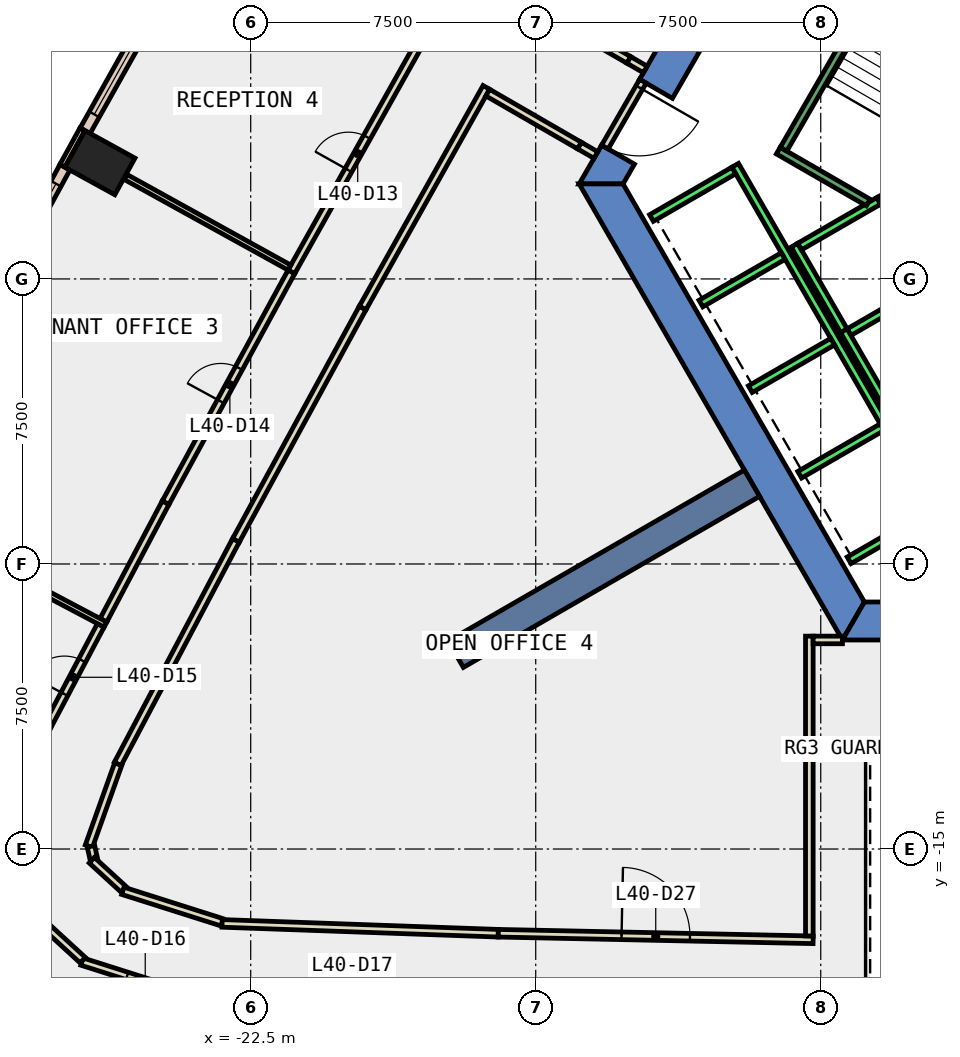
"""IFC4 building model, lengths in metres.
Left out: names, types, materials, properties, quantities, classifications, styles, units other than length and angle.
Written with IfcOpenShell. Run it as: python <this file> out.ifc"""

import sys

from ifc_helpers import new_model, si_unit, direction, frame, frame_2d, origin, origin_2d, place, context, subcontext, project, spatial, polyline, rectangle, outline, extrude, element, fill, save


model = new_model("IFC4")
c1 = context("Model", 3, precision=1e-05, world=origin(), true_north=direction((0.0, 1.0)))
c2 = subcontext(c1, "Body", "Model", "MODEL_VIEW")
j1 = project(units=[si_unit("LENGTHUNIT", "METRE"), si_unit("PLANEANGLEUNIT", "RADIAN")], contexts=[c1])
p1 = place(None, origin())
s1 = spatial("IfcSite", under=j1, at=p1, CompositionType="ELEMENT")
p2 = place(p1, origin())
s2 = spatial("IfcBuilding", under=s1, at=p2, CompositionType="ELEMENT")
p3 = place(p2, frame((0.0, 0.0, 180.2)))
s3 = spatial("IfcBuildingStorey", under=s2, at=p3, CompositionType="ELEMENT", Elevation=180.2)
p4 = place(p3, frame((-26.468, 3.059, -0.4), z_axis=(0.0, 0.0, 1.0), x_axis=(0.481983074142, 0.876180527198, 0.0)))
e1 = element("IfcColumn", 1, at=p4, inside=s3, PredefinedType="COLUMN", context=c2, shape_type="SweptSolid", body=[
    extrude(rectangle(XDim=1.1, YDim=1.5, at=origin_2d()), origin(), (0.0, 0.0, 1.0), 4.0),
])
p5 = place(p3, frame((0.0, 0.0, -0.4)))
e2 = element("IfcWall", 2, at=p5, inside=s3, PredefinedType="SHEAR", context=c2, shape_type="SweptSolid", body=[
    extrude(outline(polyline([(-12.267, 5.252), (-11.402, 4.752), (-6.351, 13.5), (-6.928, 14.5), (-12.267, 5.252)])), origin(), (0.0, 0.0, 1.0), 4.0),
])
p6 = place(p3, frame((0.0, 0.0, -0.4)))
e3 = element("IfcWall", 3, at=p6, inside=s3, PredefinedType="SHEAR", context=c2, shape_type="SweptSolid", body=[
    extrude(outline(polyline([(-12.402, 3.02), (-13.267, 3.52), (-13.856, 2.5), (-12.702, 2.5), (-12.402, 3.02)])), origin(), (0.0, 0.0, 1.0), 4.0),
])
p7 = place(p3, frame((0.0, 0.0, -0.4)))
e4 = element("IfcWall", 4, at=p7, inside=s3, PredefinedType="SHEAR", context=c2, shape_type="SweptSolid", body=[
    extrude(outline(polyline([(-13.856, 2.5), (-6.928, -9.5), (-6.351, -8.5), (-12.702, 2.5), (-13.856, 2.5)])), origin(), (0.0, 0.0, 1.0), 4.0),
])
p8 = place(p3, frame((0.0, 0.0, -0.4)))
e5 = element("IfcWall", 5, at=p8, inside=s3, PredefinedType="SHEAR", context=c2, shape_type="SweptSolid", body=[
    extrude(outline(polyline([(3.75, -9.5), (3.75, -8.5), (-6.351, -8.5), (-6.928, -9.5), (3.75, -9.5)])), origin(), (0.0, 0.0, 1.0), 4.0),
])
p9 = place(p3, frame((-9.31, -5.375, -0.4), z_axis=(0.0, 0.0, 1.0), x_axis=(-0.866017533419, -0.500013631625, 0.0)))
e6 = element("IfcWall", 6, at=p9, inside=s3, PredefinedType="SHEAR", context=c2, shape_type="SweptSolid", body=[
    extrude(rectangle(XDim=9.0, YDim=0.8, at=frame_2d((4.5, 0.0))), origin(), (0.0, 0.0, 1.0), 4.0),
])
p10 = place(p3, frame((-26.926, 3.939, 0.0), z_axis=(0.0, 0.0, 1.0), x_axis=(-0.481850587491, -0.876253394478, 0.0)))
e7 = element("IfcWall", 7, at=p10, inside=s3, PredefinedType="STANDARD", context=c2, shape_type="SweptSolid", body=[
    extrude(rectangle(XDim=1.1, YDim=0.15, at=frame_2d((0.55, 0.0))), origin(), (0.0, 0.0, 1.0), 3.6),
])
p11 = place(p3, frame((-23.936, 9.106, 0.0), z_axis=(0.0, 0.0, 1.0), x_axis=(-0.489305602904, -0.872112393541, 0.0)))
e8 = element("IfcWall", 8, at=p11, inside=s3, PredefinedType="STANDARD", context=c2, shape_type="SweptSolid", body=[
    extrude(rectangle(XDim=5.969, YDim=0.3, at=frame_2d((2.985, 0.0))), origin(), (0.0, 0.0, 1.0), 3.6),
])
p12 = place(p11, frame((0.492, 0.0, 0.9)))
e9 = element("IfcOpeningElement", 9, at=p12, cuts=e8, PredefinedType="OPENING", context=c2, shape_type="SweptSolid", body=[
    extrude(rectangle(XDim=2.0, YDim=2.6, at=frame_2d((1.0, 1.3))), frame((0.0, 0.16, 0.0), z_axis=(0.0, -1.0, 0.0), x_axis=(1.0, 0.0, 0.0)), (0.0, 0.0, 1.0), 0.32),
])
p13 = place(p11, frame((3.477, 0.0, 0.9)))
e10 = element("IfcOpeningElement", 10, at=p13, cuts=e8, PredefinedType="OPENING", context=c2, shape_type="SweptSolid", body=[
    extrude(rectangle(XDim=2.0, YDim=2.6, at=frame_2d((1.0, 1.3))), frame((0.0, 0.16, 0.0), z_axis=(0.0, -1.0, 0.0), x_axis=(1.0, 0.0, 0.0)), (0.0, 0.0, 1.0), 0.32),
])
p14 = place(p3, frame((-27.388, 2.939, 0.0), z_axis=(0.0, 0.0, 1.0), x_axis=(-0.478711740571, -0.877972134774, 0.0)))
e11 = element("IfcWall", 11, at=p14, inside=s3, PredefinedType="STANDARD", context=c2, shape_type="SweptSolid", body=[
    extrude(rectangle(XDim=5.97, YDim=0.3, at=frame_2d((2.985, 0.0))), origin(), (0.0, 0.0, 1.0), 3.6),
])
p15 = place(p14, frame((0.493, 0.0, 0.9)))
e12 = element("IfcOpeningElement", 12, at=p15, cuts=e11, PredefinedType="OPENING", context=c2, shape_type="SweptSolid", body=[
    extrude(rectangle(XDim=2.0, YDim=2.6, at=frame_2d((1.0, 1.3))), frame((0.0, 0.16, 0.0), z_axis=(0.0, -1.0, 0.0), x_axis=(1.0, 0.0, 0.0)), (0.0, 0.0, 1.0), 0.32),
])
p16 = place(p14, frame((3.478, 0.0, 0.9)))
e13 = element("IfcOpeningElement", 13, at=p16, cuts=e11, PredefinedType="OPENING", context=c2, shape_type="SweptSolid", body=[
    extrude(rectangle(XDim=2.0, YDim=2.6, at=frame_2d((1.0, 1.3))), frame((0.0, 0.16, 0.0), z_axis=(0.0, -1.0, 0.0), x_axis=(1.0, 0.0, 0.0)), (0.0, 0.0, 1.0), 0.32),
])
p17 = place(p3, frame((-14.966, 7.157, 0.0), z_axis=(0.0, 0.0, 1.0), x_axis=(0.86600487494, -0.500035555316, 0.0)))
e14 = element("IfcWall", 14, at=p17, inside=s3, PredefinedType="PARTITIONING", context=c2, shape_type="SweptSolid", body=[
    extrude(rectangle(XDim=2.79, YDim=0.2, at=frame_2d((1.395, 0.0))), origin(), (0.0, 0.0, 1.0), 3.6),
])
p18 = place(p3, frame((-22.888, -6.878, 0.0), z_axis=(0.0, 0.0, 1.0), x_axis=(-0.467533790284, -0.883975200411, 0.0)))
e15 = element("IfcWall", 15, at=p18, inside=s3, PredefinedType="PARTITIONING", context=c2, shape_type="SweptSolid", body=[
    extrude(rectangle(XDim=6.656, YDim=0.2, at=frame_2d((3.328, 0.0))), origin(), (0.0, 0.0, 1.0), 3.6),
])
p19 = place(p3, frame((-25.987, -12.768, 0.0), z_axis=(0.0, 0.0, 1.0), x_axis=(-0.33645112914, -0.941700927949, 0.0)))
e16 = element("IfcWall", 16, at=p19, inside=s3, PredefinedType="PARTITIONING", context=c2, shape_type="SweptSolid", body=[
    extrude(rectangle(XDim=2.292, YDim=0.2, at=frame_2d((1.146, 0.0))), origin(), (0.0, 0.0, 1.0), 3.6),
])
p20 = place(p3, frame((-26.703, -14.93, 0.0), z_axis=(0.0, 0.0, 1.0), x_axis=(0.216250293589, -0.976337959173, 0.0)))
e17 = element("IfcWall", 17, at=p20, inside=s3, PredefinedType="PARTITIONING", context=c2, shape_type="SweptSolid", body=[
    extrude(rectangle(XDim=0.342, YDim=0.2, at=frame_2d((0.171, 0.0))), origin(), (0.0, 0.0, 1.0), 3.6),
])
p21 = place(p3, frame((-26.681, -15.294, 0.0), z_axis=(0.0, 0.0, 1.0), x_axis=(0.737118519418, -0.675763485497, 0.0)))
e18 = element("IfcWall", 18, at=p21, inside=s3, PredefinedType="PARTITIONING", context=c2, shape_type="SweptSolid", body=[
    extrude(rectangle(XDim=1.138, YDim=0.2, at=frame_2d((0.569, 0.0))), origin(), (0.0, 0.0, 1.0), 3.6),
])
p22 = place(p3, frame((-25.864, -16.1, 0.0), z_axis=(0.0, 0.0, 1.0), x_axis=(0.953158072423, -0.302472625167, 0.0)))
e19 = element("IfcWall", 19, at=p22, inside=s3, PredefinedType="PARTITIONING", context=c2, shape_type="SweptSolid", body=[
    extrude(rectangle(XDim=2.743, YDim=0.2, at=frame_2d((1.372, 0.0))), origin(), (0.0, 0.0, 1.0), 3.6),
])
p23 = place(p3, frame((-23.253, -16.957, 0.0), z_axis=(0.0, 0.0, 1.0), x_axis=(0.999365460355, -0.035618487468, 0.0)))
e20 = element("IfcWall", 20, at=p23, inside=s3, PredefinedType="PARTITIONING", context=c2, shape_type="SweptSolid", body=[
    extrude(rectangle(XDim=7.272, YDim=0.2, at=frame_2d((3.636, 0.0))), origin(), (0.0, 0.0, 1.0), 3.6),
])
p24 = place(p3, frame((-15.985, -17.216, 0.0), z_axis=(0.0, 0.0, 1.0), x_axis=(0.999782442794, -0.020858261713, 0.0)))
e21 = element("IfcWall", 21, at=p24, inside=s3, PredefinedType="PARTITIONING", context=c2, shape_type="SweptSolid", body=[
    extrude(rectangle(XDim=8.287, YDim=0.2, at=frame_2d((4.144, 0.0))), origin(), (0.0, 0.0, 1.0), 3.6),
])
p25 = place(p24, frame((3.244, 0.0, 0.0)))
e22 = element("IfcOpeningElement", 22, at=p25, cuts=e21, PredefinedType="OPENING", context=c2, shape_type="SweptSolid", body=[
    extrude(rectangle(XDim=1.8, YDim=2.1, at=frame_2d((0.9, 1.05))), frame((0.0, 0.11, 0.0), z_axis=(0.0, -1.0, 0.0), x_axis=(1.0, 0.0, 0.0)), (0.0, 0.0, 1.0), 0.22),
])
p26 = place(p3, frame((-13.417, 3.26, 0.0), z_axis=(0.0, 0.0, 1.0), x_axis=(-0.866071776036, 0.499919672301, 0.0)))
e23 = element("IfcWall", 23, at=p26, inside=s3, PredefinedType="PARTITIONING", context=c2, shape_type="SweptSolid", body=[
    extrude(rectangle(XDim=0.5, YDim=0.2, at=frame_2d((0.25, 0.0))), origin(), (0.0, 0.0, 1.0), 2.4),
])
p27 = place(p3, frame((-16.299, 5.04, 0.0), z_axis=(0.0, 0.0, 1.0), x_axis=(-0.489219677344, -0.872160597195, 0.0)))
e24 = element("IfcWall", 24, at=p27, inside=s3, PredefinedType="PARTITIONING", context=c2, shape_type="SweptSolid", body=[
    extrude(rectangle(XDim=6.657, YDim=0.2, at=frame_2d((3.329, 0.0))), origin(), (0.0, 0.0, 1.0), 3.6),
])
p28 = place(p3, frame((-19.556, -0.766, 0.0), z_axis=(0.0, 0.0, 1.0), x_axis=(-0.478665365973, -0.877997418799, 0.0)))
e25 = element("IfcWall", 25, at=p28, inside=s3, PredefinedType="PARTITIONING", context=c2, shape_type="SweptSolid", body=[
    extrude(rectangle(XDim=6.961, YDim=0.2, at=frame_2d((3.48, 0.0))), origin(), (0.0, 0.0, 1.0), 3.6),
])
p29 = place(p3, frame((-21.43, 0.185, 0.0), z_axis=(0.0, 0.0, 1.0), x_axis=(0.489124577711, 0.872213934468, 0.0)))
e26 = element("IfcWall", 26, at=p29, inside=s3, PredefinedType="PARTITIONING", context=c2, shape_type="SweptSolid", body=[
    extrude(rectangle(XDim=6.988, YDim=0.2, at=frame_2d((3.494, 0.0))), origin(), (0.0, 0.0, 1.0), 3.6),
])
p30 = place(p29, frame((3.069, 0.0, 0.0)))
e27 = element("IfcOpeningElement", 27, at=p30, cuts=e26, PredefinedType="OPENING", context=c2, shape_type="SweptSolid", body=[
    extrude(rectangle(XDim=1.0, YDim=2.1, at=frame_2d((0.5, 1.05))), frame((0.0, 0.11, 0.0), z_axis=(0.0, -1.0, 0.0), x_axis=(1.0, 0.0, 0.0)), (0.0, 0.0, 1.0), 0.22),
])
p31 = place(p3, frame((-26.376, -8.982, 0.0), z_axis=(0.0, 0.0, 1.0), x_axis=(0.467529077139, 0.883977693174, 0.0)))
e28 = element("IfcWall", 28, at=p31, inside=s3, PredefinedType="PARTITIONING", context=c2, shape_type="SweptSolid", body=[
    extrude(rectangle(XDim=3.503, YDim=0.2, at=frame_2d((1.752, 0.0))), origin(), (0.0, 0.0, 1.0), 3.6),
])
p32 = place(p3, frame((-24.738, -5.885, 0.0), z_axis=(0.0, 0.0, 1.0), x_axis=(0.478535377863, 0.878068273048, 0.0)))
e29 = element("IfcWall", 29, at=p32, inside=s3, PredefinedType="PARTITIONING", context=c2, shape_type="SweptSolid", body=[
    extrude(rectangle(XDim=6.913, YDim=0.2, at=frame_2d((3.457, 0.0))), origin(), (0.0, 0.0, 1.0), 3.6),
])
p33 = place(p32, frame((3.031, 0.0, 0.0)))
e30 = element("IfcOpeningElement", 30, at=p33, cuts=e29, PredefinedType="OPENING", context=c2, shape_type="SweptSolid", body=[
    extrude(rectangle(XDim=1.0, YDim=2.1, at=frame_2d((0.5, 1.05))), frame((0.0, 0.11, 0.0), z_axis=(0.0, -1.0, 0.0), x_axis=(1.0, 0.0, 0.0)), (0.0, 0.0, 1.0), 0.22),
])
p34 = place(p3, frame((-27.891, -11.847, 0.0), z_axis=(0.0, 0.0, 1.0), x_axis=(0.467571923705, 0.883955030623, 0.0)))
e31 = element("IfcWall", 31, at=p34, inside=s3, PredefinedType="PARTITIONING", context=c2, shape_type="SweptSolid", body=[
    extrude(rectangle(XDim=3.091, YDim=0.2, at=frame_2d((1.545, 0.0))), origin(), (0.0, 0.0, 1.0), 3.6),
])
p35 = place(p34, frame((1.045, 0.0, 0.0)))
e32 = element("IfcOpeningElement", 32, at=p35, cuts=e31, PredefinedType="OPENING", context=c2, shape_type="SweptSolid", body=[
    extrude(rectangle(XDim=1.0, YDim=2.1, at=frame_2d((0.5, 1.05))), frame((0.0, 0.11, 0.0), z_axis=(0.0, -1.0, 0.0), x_axis=(1.0, 0.0, 0.0)), (0.0, 0.0, 1.0), 0.22),
])
p36 = place(p3, frame((-23.61, -19.019, 0.0), z_axis=(0.0, 0.0, 1.0), x_axis=(-0.953121068097, 0.302589209243, 0.0)))
e33 = element("IfcWall", 33, at=p36, inside=s3, PredefinedType="PARTITIONING", context=c2, shape_type="SweptSolid", body=[
    extrude(rectangle(XDim=3.494, YDim=0.2, at=frame_2d((1.747, 0.0))), origin(), (0.0, 0.0, 1.0), 3.6),
])
p37 = place(p36, frame((1.247, 0.0, 0.0)))
e34 = element("IfcOpeningElement", 34, at=p37, cuts=e33, PredefinedType="OPENING", context=c2, shape_type="SweptSolid", body=[
    extrude(rectangle(XDim=1.0, YDim=2.1, at=frame_2d((0.5, 1.05))), frame((0.0, 0.11, 0.0), z_axis=(0.0, -1.0, 0.0), x_axis=(1.0, 0.0, 0.0)), (0.0, 0.0, 1.0), 0.22),
])
p38 = place(p3, frame((-26.919, -17.925, 0.0), z_axis=(0.0, 0.0, 1.0), x_axis=(-0.737118331834, 0.675763690112, 0.0)))
e35 = element("IfcWall", 35, at=p38, inside=s3, PredefinedType="PARTITIONING", context=c2, shape_type="SweptSolid", body=[
    extrude(rectangle(XDim=2.264, YDim=0.2, at=frame_2d((1.132, 0.0))), origin(), (0.0, 0.0, 1.0), 3.6),
])
p39 = place(p3, frame((-7.8, -17.287, 0.0), z_axis=(0.0, 0.0, 1.0), x_axis=(0.0, 1.0, 0.0)))
e36 = element("IfcWall", 36, at=p39, inside=s3, PredefinedType="PARTITIONING", context=c2, shape_type="SweptSolid", body=[
    extrude(rectangle(XDim=7.888, YDim=0.2, at=frame_2d((3.944, 0.0))), origin(), (0.0, 0.0, 1.0), 3.6),
])
p40 = place(p3, frame((-7.7, -9.499, 0.0), z_axis=(0.0, 0.0, 1.0), x_axis=(1.0, 0.0, 0.0)))
e37 = element("IfcWall", 37, at=p40, inside=s3, PredefinedType="PARTITIONING", context=c2, shape_type="SweptSolid", body=[
    extrude(rectangle(XDim=0.771, YDim=0.2, at=frame_2d((0.385, 0.0))), origin(), (0.0, 0.0, 1.0), 3.6),
])
p41 = place(p3, frame((-21.481, 0.299, 0.0), z_axis=(0.0, 0.0, 1.0), x_axis=(-0.875073760972, 0.483989579286, 0.0)))
e38 = element("IfcWall", 38, at=p41, inside=s3, PredefinedType="PARTITIONING", context=c2, shape_type="SweptSolid", body=[
    extrude(rectangle(XDim=4.93, YDim=0.15, at=frame_2d((2.465, 0.0))), origin(), (0.0, 0.0, 1.0), 3.6),
])
p42 = place(p3, frame((-26.323, -9.095, 0.0), z_axis=(0.0, 0.0, 1.0), x_axis=(-0.883977869384, 0.467528743971, 0.0)))
e39 = element("IfcWall", 39, at=p42, inside=s3, PredefinedType="PARTITIONING", context=c2, shape_type="SweptSolid", body=[
    extrude(rectangle(XDim=6.5, YDim=0.15, at=frame_2d((3.25, 0.0))), origin(), (0.0, 0.0, 1.0), 3.6),
])
p43 = place(p3, frame((-12.18, 5.202, 0.0), z_axis=(0.0, 0.0, 1.0), x_axis=(-0.50002537861, -0.866010750942, 0.0)))
e40 = element("IfcWall", 40, at=p43, inside=s3, PredefinedType="PARTITIONING", context=c2, shape_type="SweptSolid", body=[
    extrude(rectangle(XDim=2.0, YDim=0.2, at=frame_2d((1.0, 0.0))), origin(), (0.0, 0.0, 1.0), 2.4),
])
p44 = place(p43, frame((0.19, 0.0, 0.0)))
e41 = element("IfcOpeningElement", 41, at=p44, cuts=e40, PredefinedType="OPENING", context=c2, shape_type="SweptSolid", body=[
    extrude(rectangle(XDim=1.8, YDim=2.1, at=frame_2d((0.9, 1.05))), frame((0.0, 0.11, 0.0), z_axis=(0.0, -1.0, 0.0), x_axis=(1.0, 0.0, 0.0)), (0.0, 0.0, 1.0), 0.22),
])
p45 = place(p3, frame((-12.55, 5.762, 0.0), z_axis=(0.0, 0.0, 1.0), x_axis=(0.866071776036, -0.499919672301, 0.0)))
e42 = element("IfcWall", 42, at=p45, inside=s3, PredefinedType="PARTITIONING", context=c2, shape_type="SweptSolid", body=[
    extrude(rectangle(XDim=0.5, YDim=0.2, at=frame_2d((0.25, 0.0))), origin(), (0.0, 0.0, 1.0), 2.4),
])
p46 = place(p3, frame((-13.85, 3.51, 0.0), z_axis=(0.0, 0.0, 1.0), x_axis=(-0.866087780421, 0.49989194493, 0.0)))
e43 = element("IfcWall", 43, at=p46, inside=s3, PredefinedType="PARTITIONING", context=c2, shape_type="SweptSolid", body=[
    extrude(rectangle(XDim=2.785, YDim=0.2, at=frame_2d((1.392, 0.0))), origin(), (0.0, 0.0, 1.0), 3.6),
])
p47 = place(p3, frame((-5.94, 2.188, 0.0), z_axis=(0.0, 0.0, 1.0), x_axis=(0.49994636267, -0.866056369097, 0.0)))
e44 = element("IfcWall", 44, at=p47, inside=s3, PredefinedType="STANDARD", context=c2, shape_type="SweptSolid", body=[
    extrude(rectangle(XDim=2.8, YDim=0.2, at=frame_2d((1.4, 0.0))), origin(), (0.0, 0.0, 1.0), 3.6),
])
p48 = place(p47, frame((1.225, 0.0, 0.0)))
e45 = element("IfcOpeningElement", 45, at=p48, cuts=e44, PredefinedType="OPENING", context=c2, shape_type="SweptSolid", body=[
    extrude(rectangle(XDim=1.1, YDim=2.1, at=frame_2d((0.55, 1.05))), frame((0.0, 0.11, 0.0), z_axis=(0.0, -1.0, 0.0), x_axis=(1.0, 0.0, 0.0)), (0.0, 0.0, 1.0), 0.22),
])
p49 = place(p3, frame((-8.192, 0.888, 0.0), z_axis=(0.0, 0.0, 1.0), x_axis=(0.49994636267, -0.866056369097, 0.0)))
e46 = element("IfcWall", 46, at=p49, inside=s3, PredefinedType="STANDARD", context=c2, shape_type="SweptSolid", body=[
    extrude(rectangle(XDim=2.8, YDim=0.2, at=frame_2d((1.4, 0.0))), origin(), (0.0, 0.0, 1.0), 3.6),
])
for number, where, z_axis, x_axis in (
    (47, (-5.977, 2.052, 0.0), (0.0, 0.0, 1.0), (-0.866, -0.5, 0.0)),
    (48, (-4.677, -0.2, 0.0), (0.0, 0.0, 1.0), (-0.866, -0.5, 0.0)),
):
    element("IfcWall", number, at=place(p3, frame(where, z_axis=z_axis, x_axis=x_axis)), inside=s3, PredefinedType="STANDARD", context=c2, shape_type="SweptSolid", body=[
        extrude(rectangle(XDim=2.399, YDim=0.2, at=frame_2d((1.2, 0.0))), origin(), (0.0, 0.0, 1.0), 3.6),
    ])
p50 = place(p3, frame((-9.751, 2.99, 0.0), z_axis=(0.0, 0.0, 1.0), x_axis=(0.50000090737, -0.866024879913, 0.0)))
e49 = element("IfcWall", 49, at=p50, inside=s3, PredefinedType="STANDARD", context=c2, shape_type="SweptSolid", body=[
    extrude(rectangle(XDim=10.6, YDim=0.2, at=frame_2d((5.3, 0.0))), origin(), (0.0, 0.0, 1.0), 3.6),
])
p51 = place(p3, frame((-9.788, 2.853, 0.0), z_axis=(0.0, 0.0, 1.0), x_axis=(-0.865998541277, -0.500046524342, 0.0)))
e50 = element("IfcWall", 50, at=p51, inside=s3, PredefinedType="STANDARD", context=c2, shape_type="SweptSolid", body=[
    extrude(rectangle(XDim=2.5, YDim=0.2, at=frame_2d((1.25, 0.0))), origin(), (0.0, 0.0, 1.0), 3.6),
])
for number, where, z_axis, x_axis in (
    (51, (-8.488, 0.602, 0.0), (0.0, 0.0, 1.0), (-0.866, -0.5, 0.0)),
    (52, (-7.188, -1.65, 0.0), (0.0, 0.0, 1.0), (-0.866, -0.5, 0.0)),
    (53, (-5.888, -3.902, 0.0), (0.0, 0.0, 1.0), (-0.866, -0.5, 0.0)),
    (54, (-4.588, -6.153, 0.0), (0.0, 0.0, 1.0), (-0.866, -0.5, 0.0)),
):
    element("IfcWall", number, at=place(p3, frame(where, z_axis=z_axis, x_axis=x_axis)), inside=s3, PredefinedType="STANDARD", context=c2, shape_type="SweptSolid", body=[
        extrude(rectangle(XDim=2.5, YDim=0.2, at=frame_2d((1.25, 0.0))), origin(), (0.0, 0.0, 1.0), 3.6),
    ])
p52 = place(p3, frame((-6.892, -1.363, 0.0), z_axis=(0.0, 0.0, 1.0), x_axis=(0.500011755427, -0.866018616679, 0.0)))
e55 = element("IfcWall", 55, at=p52, inside=s3, PredefinedType="STANDARD", context=c2, shape_type="SweptSolid", body=[
    extrude(rectangle(XDim=2.8, YDim=0.2, at=frame_2d((1.4, 0.0))), origin(), (0.0, 0.0, 1.0), 2.3),
])
p53 = place(p3, frame((-6.25, 2.01, 0.0), z_axis=(0.0, 0.0, 1.0), x_axis=(-0.86611865017, 0.499838457731, 0.0)))
e56 = element("IfcWall", 56, at=p53, inside=s3, PredefinedType="STANDARD", context=c2, shape_type="SweptSolid", body=[
    extrude(rectangle(XDim=2.733, YDim=0.2, at=frame_2d((1.366, 0.0))), origin(), (0.0, 0.0, 1.0), 3.6),
])
p54 = place(p3, frame((-5.03, 9.388, 0.0), z_axis=(0.0, 0.0, 1.0), x_axis=(-0.499978703459, -0.866037698999, 0.0)))
e57 = element("IfcWall", 57, at=p54, inside=s3, PredefinedType="STANDARD", context=c2, shape_type="SweptSolid", body=[
    extrude(rectangle(XDim=6.9, YDim=0.2, at=frame_2d((3.45, 0.0))), origin(), (0.0, 0.0, 1.0), 3.6),
])
p55 = place(p13, origin())
e58 = element("IfcWindow", 58, at=p55, inside=s3, PartitioningType="SINGLE_PANEL", PredefinedType="WINDOW", context=c2, shape_type="SweptSolid", body=[
    extrude(rectangle(XDim=2.0, YDim=2.6, at=frame_2d((1.0, 1.3))), frame((0.0, 0.03, 0.0), z_axis=(0.0, -1.0, 0.0), x_axis=(1.0, 0.0, 0.0)), (0.0, 0.0, 1.0), 0.06),
])
fill(e10, e58)
p56 = place(p15, origin())
e59 = element("IfcWindow", 59, at=p56, inside=s3, PartitioningType="SINGLE_PANEL", PredefinedType="WINDOW", context=c2, shape_type="SweptSolid", body=[
    extrude(rectangle(XDim=2.0, YDim=2.6, at=frame_2d((1.0, 1.3))), frame((0.0, 0.03, 0.0), z_axis=(0.0, -1.0, 0.0), x_axis=(1.0, 0.0, 0.0)), (0.0, 0.0, 1.0), 0.06),
])
fill(e12, e59)
p57 = place(p30, origin())
e60 = element("IfcDoor", 60, at=p57, inside=s3, OperationType="SINGLE_SWING_LEFT", PredefinedType="DOOR", context=c2, shape_type="SweptSolid", body=[
    extrude(rectangle(XDim=1.0, YDim=2.1, at=frame_2d((0.5, 1.05))), frame((0.0, 0.025, 0.0), z_axis=(0.0, -1.0, 0.0), x_axis=(1.0, 0.0, 0.0)), (0.0, 0.0, 1.0), 0.05),
])
fill(e27, e60)
p58 = place(p33, origin())
e61 = element("IfcDoor", 61, at=p58, inside=s3, OperationType="SINGLE_SWING_RIGHT", PredefinedType="DOOR", context=c2, shape_type="SweptSolid", body=[
    extrude(rectangle(XDim=1.0, YDim=2.1, at=frame_2d((0.5, 1.05))), frame((0.0, 0.025, 0.0), z_axis=(0.0, -1.0, 0.0), x_axis=(1.0, 0.0, 0.0)), (0.0, 0.0, 1.0), 0.05),
])
fill(e30, e61)
p59 = place(p35, origin())
e62 = element("IfcDoor", 62, at=p59, inside=s3, OperationType="SINGLE_SWING_LEFT", PredefinedType="DOOR", context=c2, shape_type="SweptSolid", body=[
    extrude(rectangle(XDim=1.0, YDim=2.1, at=frame_2d((0.5, 1.05))), frame((0.0, 0.025, 0.0), z_axis=(0.0, -1.0, 0.0), x_axis=(1.0, 0.0, 0.0)), (0.0, 0.0, 1.0), 0.05),
])
fill(e32, e62)
p60 = place(p37, origin())
e63 = element("IfcDoor", 63, at=p60, inside=s3, OperationType="SINGLE_SWING_LEFT", PredefinedType="DOOR", context=c2, shape_type="SweptSolid", body=[
    extrude(rectangle(XDim=1.0, YDim=2.1, at=frame_2d((0.5, 1.05))), frame((0.0, 0.025, 0.0), z_axis=(0.0, -1.0, 0.0), x_axis=(1.0, 0.0, 0.0)), (0.0, 0.0, 1.0), 0.05),
])
fill(e34, e63)
p61 = place(p25, origin())
e64 = element("IfcDoor", 64, at=p61, inside=s3, OperationType="DOUBLE_DOOR_SINGLE_SWING", PredefinedType="DOOR", context=c2, shape_type="SweptSolid", body=[
    extrude(rectangle(XDim=1.8, YDim=2.1, at=frame_2d((0.9, 1.05))), frame((0.0, 0.025, 0.0), z_axis=(0.0, -1.0, 0.0), x_axis=(1.0, 0.0, 0.0)), (0.0, 0.0, 1.0), 0.05),
])
fill(e22, e64)
p62 = place(p44, origin())
e65 = element("IfcDoor", 65, at=p62, inside=s3, OperationType="DOUBLE_DOOR_SINGLE_SWING", PredefinedType="DOOR", context=c2, shape_type="SweptSolid", body=[
    extrude(rectangle(XDim=1.8, YDim=2.1, at=frame_2d((0.9, 1.05))), frame((0.0, 0.025, 0.0), z_axis=(0.0, -1.0, 0.0), x_axis=(1.0, 0.0, 0.0)), (0.0, 0.0, 1.0), 0.05),
])
fill(e41, e65)
save(model, sys.argv[1])
